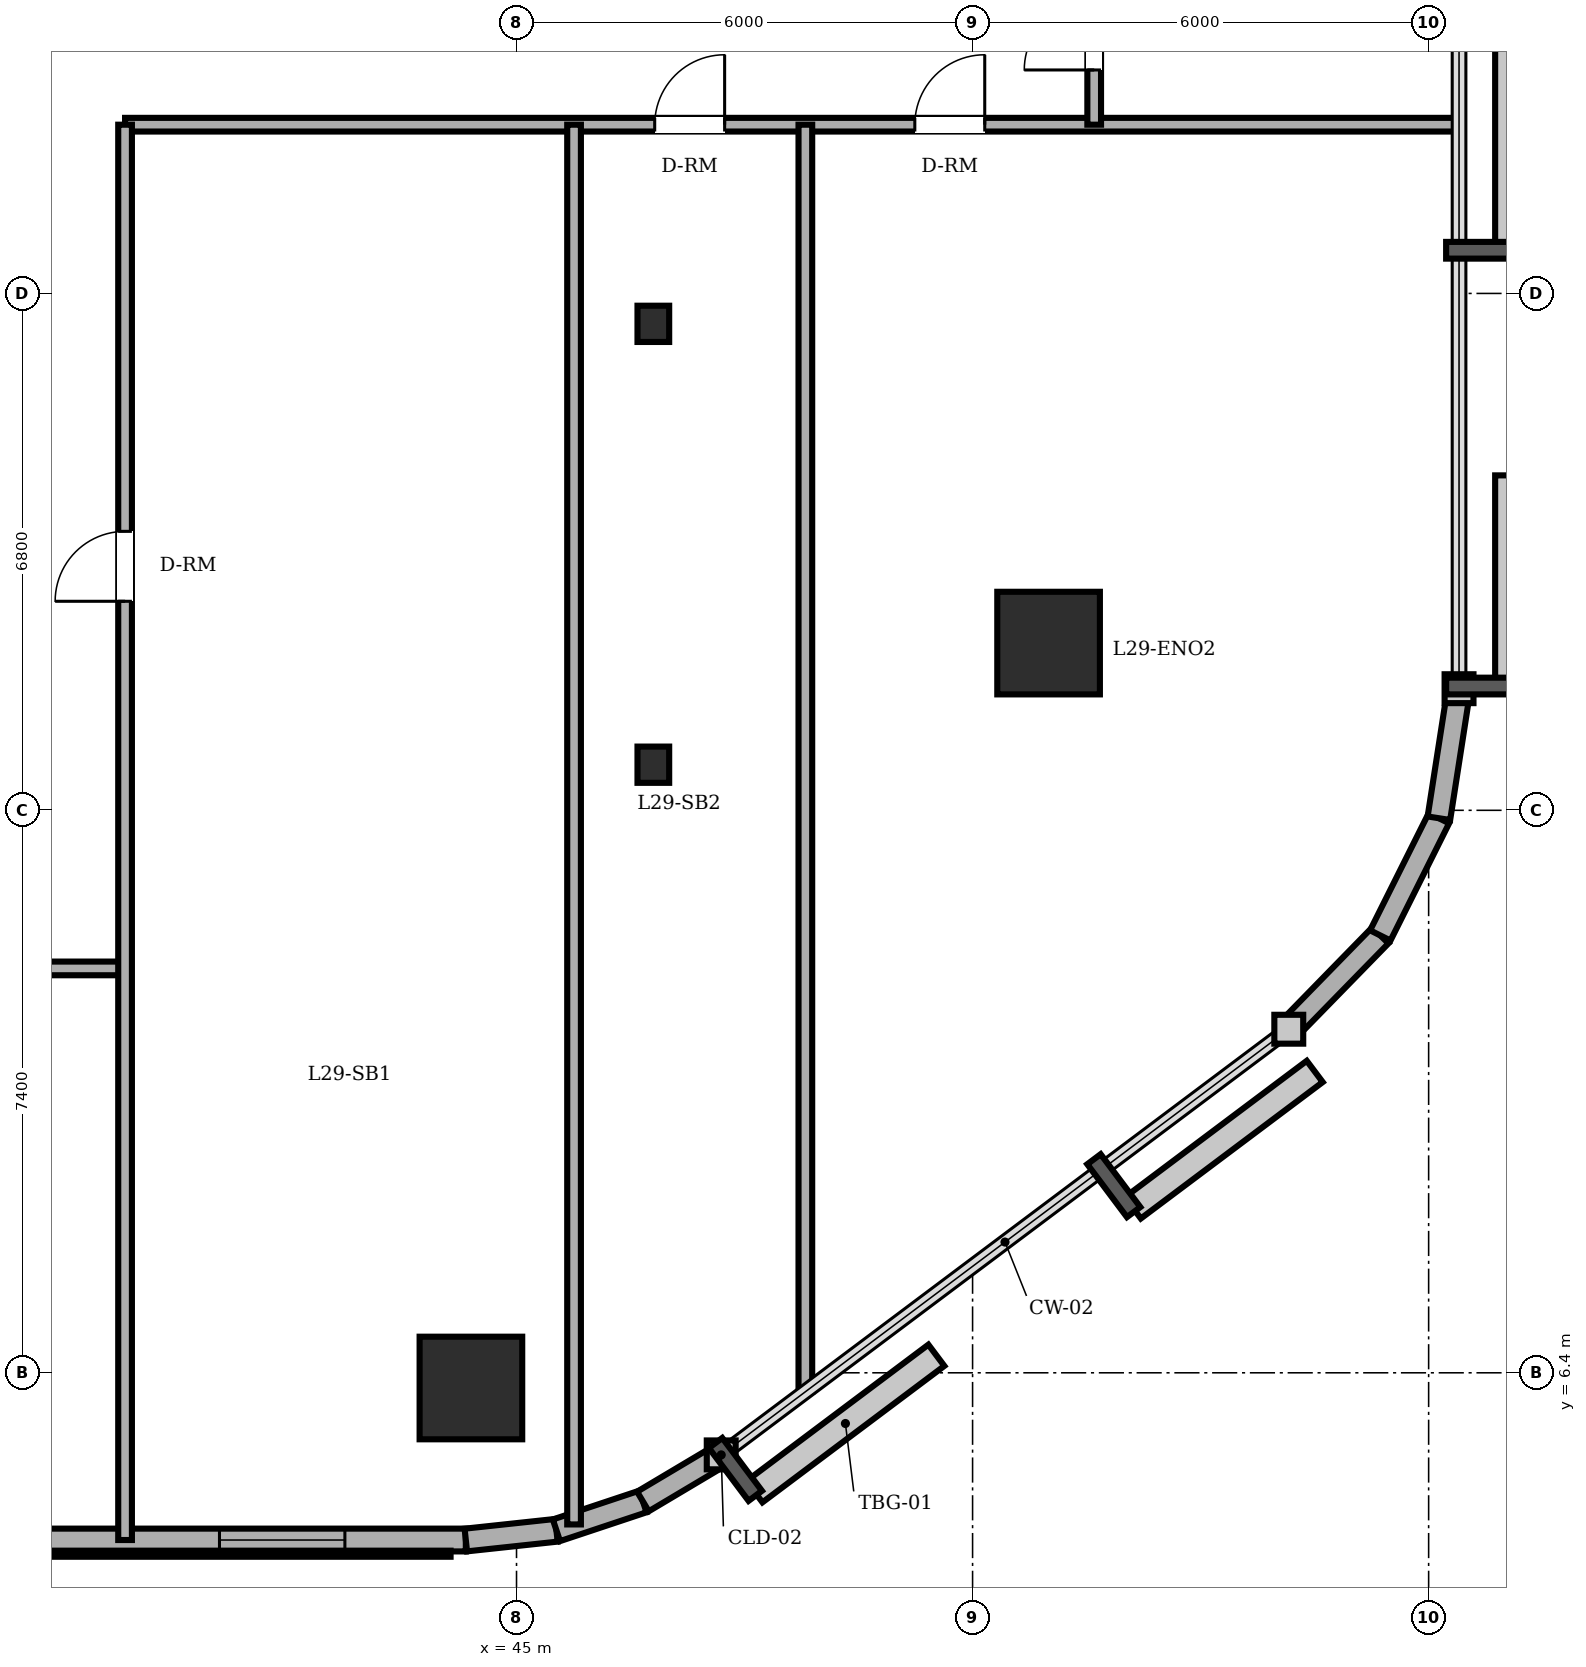
"""IFC4 building model, lengths in metres.
Left out: names, types, materials, properties, quantities, classifications, styles, units other than length and angle.
Written with IfcOpenShell. Run it as: python <this file> out.ifc"""

import sys

from ifc_helpers import new_model, si_unit, direction, frame, frame_2d, origin, origin_2d, place, context, subcontext, project, spatial, rectangle, circle, i_section, extrude, element, fill, save


model = new_model("IFC4")
c1 = context("Model", 3, precision=1e-05, world=origin(), true_north=direction((0.0, 1.0)))
c2 = subcontext(c1, "Body", "Model", "MODEL_VIEW")
j1 = project(units=[si_unit("LENGTHUNIT", "METRE"), si_unit("PLANEANGLEUNIT", "RADIAN")], contexts=[c1])
p1 = place(None, origin())
s1 = spatial("IfcSite", under=j1, at=p1, CompositionType="ELEMENT")
p2 = place(p1, origin())
s2 = spatial("IfcBuilding", under=s1, at=p2, CompositionType="ELEMENT")
p3 = place(p2, frame((0.0, 0.0, 111.5)))
s3 = spatial("IfcBuildingStorey", under=s2, at=p3, CompositionType="ELEMENT", Elevation=111.5)
for number, where, z_axis, x_axis in (
    (1, (44.4, 6.2, 0.0), (0.0, 0.0, 1.0), (1.0, 0.0, 0.0)),
    (2, (52.0, 16.0, 0.0), (0.0, 0.0, 1.0), (1.0, 0.0, 0.0)),
):
    element("IfcColumn", number, at=place(p3, frame(where, z_axis=z_axis, x_axis=x_axis)), inside=s3, PredefinedType="COLUMN", context=c2, shape_type="SweptSolid", body=[
        extrude(circle(Radius=0.675, at=origin_2d()), origin(), (0.0, 0.0, 1.0), 3.6),
    ])
for number, where, z_axis, x_axis in (
    (3, (46.8, 14.4, 0.0), (0.0, 0.0, 1.0), (1.0, 0.0, 0.0)),
    (4, (46.8, 20.2, 0.0), (0.0, 0.0, 1.0), (1.0, 0.0, 0.0)),
):
    element("IfcColumn", number, at=place(p3, frame(where, z_axis=z_axis, x_axis=x_axis)), inside=s3, PredefinedType="COLUMN", context=c2, shape_type="SweptSolid", body=[
        extrude(i_section(OverallWidth=0.417, OverallDepth=0.477, WebThickness=0.036, FlangeThickness=0.057, FilletRadius=0.015, at=origin_2d()), origin(), (0.0, 0.0, 1.0), 3.6),
    ])
p4 = place(p3, frame((14.4, 4.2, 0.0), z_axis=(0.0, 0.0, 1.0), x_axis=(1.0, 0.0, 0.0)))
e5 = element("IfcWall", 5, at=p4, inside=s3, PredefinedType="SOLIDWALL", context=c2, shape_type="SweptSolid", body=[
    extrude(rectangle(XDim=29.933, YDim=0.3, at=frame_2d((14.967, 0.0))), origin(), (0.0, 0.0, 1.0), 3.4),
])
p5 = place(p4, frame((10.625, 0.0, 0.0)))
e6 = element("IfcOpeningElement", 6, at=p5, cuts=e5, PredefinedType="OPENING", context=c2, shape_type="SweptSolid", body=[
    extrude(rectangle(XDim=0.95, YDim=2.2, at=frame_2d((0.475, 1.1))), frame((0.0, 0.16, 0.0), z_axis=(0.0, -1.0, 0.0), x_axis=(1.0, 0.0, 0.0)), (0.0, 0.0, 1.0), 0.32),
])
p6 = place(p4, frame((2.808, 0.0, 0.85)))
e7 = element("IfcOpeningElement", 7, at=p6, cuts=e5, PredefinedType="OPENING", context=c2, shape_type="SweptSolid", body=[
    extrude(rectangle(XDim=1.65, YDim=1.55, at=frame_2d((0.825, 0.775))), frame((0.0, 0.16, 0.0), z_axis=(0.0, -1.0, 0.0), x_axis=(1.0, 0.0, 0.0)), (0.0, 0.0, 1.0), 0.32),
])
p7 = place(p4, frame((6.092, 0.0, 0.85)))
e8 = element("IfcOpeningElement", 8, at=p7, cuts=e5, PredefinedType="OPENING", context=c2, shape_type="SweptSolid", body=[
    extrude(rectangle(XDim=1.65, YDim=1.55, at=frame_2d((0.825, 0.775))), frame((0.0, 0.16, 0.0), z_axis=(0.0, -1.0, 0.0), x_axis=(1.0, 0.0, 0.0)), (0.0, 0.0, 1.0), 0.32),
])
p8 = place(p4, frame((16.992, 0.0, 0.85)))
e9 = element("IfcOpeningElement", 9, at=p8, cuts=e5, PredefinedType="OPENING", context=c2, shape_type="SweptSolid", body=[
    extrude(rectangle(XDim=1.65, YDim=1.55, at=frame_2d((0.825, 0.775))), frame((0.0, 0.16, 0.0), z_axis=(0.0, -1.0, 0.0), x_axis=(1.0, 0.0, 0.0)), (0.0, 0.0, 1.0), 0.32),
])
p9 = place(p4, frame((20.808, 0.0, 0.85)))
e10 = element("IfcOpeningElement", 10, at=p9, cuts=e5, PredefinedType="OPENING", context=c2, shape_type="SweptSolid", body=[
    extrude(rectangle(XDim=1.65, YDim=1.55, at=frame_2d((0.825, 0.775))), frame((0.0, 0.16, 0.0), z_axis=(0.0, -1.0, 0.0), x_axis=(1.0, 0.0, 0.0)), (0.0, 0.0, 1.0), 0.32),
])
p10 = place(p4, frame((26.692, 0.0, 0.85)))
e11 = element("IfcOpeningElement", 11, at=p10, cuts=e5, PredefinedType="OPENING", context=c2, shape_type="SweptSolid", body=[
    extrude(rectangle(XDim=1.65, YDim=1.55, at=frame_2d((0.825, 0.775))), frame((0.0, 0.16, 0.0), z_axis=(0.0, -1.0, 0.0), x_axis=(1.0, 0.0, 0.0)), (0.0, 0.0, 1.0), 0.32),
])
p11 = place(p3, frame((44.333, 4.2, 0.0), z_axis=(0.0, 0.0, 1.0), x_axis=(0.994289103787, 0.106720092254, 0.0)))
e12 = element("IfcWall", 12, at=p11, inside=s3, PredefinedType="SOLIDWALL", context=c2, shape_type="SweptSolid", body=[
    extrude(rectangle(XDim=1.199, YDim=0.3, at=frame_2d((0.599, 0.0))), origin(), (0.0, 0.0, 1.0), 3.4),
])
p12 = place(p3, frame((45.525, 4.328, 0.0), z_axis=(0.0, 0.0, 1.0), x_axis=(0.948744332129, 0.316044604847, 0.0)))
e13 = element("IfcWall", 13, at=p12, inside=s3, PredefinedType="SOLIDWALL", context=c2, shape_type="SweptSolid", body=[
    extrude(rectangle(XDim=1.2, YDim=0.3, at=frame_2d((0.6, 0.0))), origin(), (0.0, 0.0, 1.0), 3.4),
])
p13 = place(p3, frame((46.663, 4.707, 0.0), z_axis=(0.0, 0.0, 1.0), x_axis=(0.859320591642, 0.511437308749, 0.0)))
e14 = element("IfcWall", 14, at=p13, inside=s3, PredefinedType="SOLIDWALL", context=c2, shape_type="SweptSolid", body=[
    extrude(rectangle(XDim=1.199, YDim=0.3, at=frame_2d((0.599, 0.0))), origin(), (0.0, 0.0, 1.0), 3.4),
])
for number, where, z_axis, x_axis in (
    (15, (55.16, 10.92, 0.0), (0.0, 0.0, 1.0), (0.698, 0.716, 0.0)),
    (16, (56.364, 12.154, 0.0), (0.0, 0.0, 1.0), (0.447, 0.894, 0.0)),
):
    element("IfcWall", number, at=place(p3, frame(where, z_axis=z_axis, x_axis=x_axis)), inside=s3, PredefinedType="SOLIDWALL", context=c2, shape_type="SweptSolid", body=[
        extrude(rectangle(XDim=1.724, YDim=0.3, at=frame_2d((0.862, 0.0))), origin(), (0.0, 0.0, 1.0), 3.4),
    ])
p14 = place(p3, frame((57.135, 13.696, 0.0), z_axis=(0.0, 0.0, 1.0), x_axis=(0.153620989032, 0.988129845581, 0.0)))
e17 = element("IfcWall", 17, at=p14, inside=s3, PredefinedType="SOLIDWALL", context=c2, shape_type="SweptSolid", body=[
    extrude(rectangle(XDim=1.724, YDim=0.3, at=frame_2d((0.862, 0.0))), origin(), (0.0, 0.0, 1.0), 3.4),
])
p15 = place(p3, frame((8.8, 11.72, 0.0), z_axis=(0.0, 0.0, 1.0), x_axis=(1.0, 0.0, 0.0)))
e18 = element("IfcWall", 18, at=p15, inside=s3, PredefinedType="PARTITIONING", context=c2, shape_type="SweptSolid", body=[
    extrude(rectangle(XDim=31.05, YDim=0.18, at=frame_2d((15.525, 0.0))), origin(), (0.0, 0.0, 1.0), 3.4),
])
p16 = place(p15, frame((17.24, 0.0, 0.0)))
e19 = element("IfcOpeningElement", 19, at=p16, cuts=e18, PredefinedType="OPENING", context=c2, shape_type="SweptSolid", body=[
    extrude(rectangle(XDim=0.92, YDim=2.1, at=frame_2d((0.46, 1.05))), frame((0.0, 0.1, 0.0), z_axis=(0.0, -1.0, 0.0), x_axis=(1.0, 0.0, 0.0)), (0.0, 0.0, 1.0), 0.2),
])
p17 = place(p15, frame((8.04, 0.0, 0.0)))
e20 = element("IfcOpeningElement", 20, at=p17, cuts=e18, PredefinedType="OPENING", context=c2, shape_type="SweptSolid", body=[
    extrude(rectangle(XDim=0.92, YDim=2.1, at=frame_2d((0.46, 1.05))), frame((0.0, 0.1, 0.0), z_axis=(0.0, -1.0, 0.0), x_axis=(1.0, 0.0, 0.0)), (0.0, 0.0, 1.0), 0.2),
])
p18 = place(p15, frame((24.605, 0.0, 0.0)))
e21 = element("IfcOpeningElement", 21, at=p18, cuts=e18, PredefinedType="OPENING", context=c2, shape_type="SweptSolid", body=[
    extrude(rectangle(XDim=0.92, YDim=2.1, at=frame_2d((0.46, 1.05))), frame((0.0, 0.1, 0.0), z_axis=(0.0, -1.0, 0.0), x_axis=(1.0, 0.0, 0.0)), (0.0, 0.0, 1.0), 0.2),
])
p19 = place(p3, frame((39.85, 22.82, 0.0), z_axis=(0.0, 0.0, 1.0), x_axis=(1.0, 0.0, 0.0)))
e22 = element("IfcWall", 22, at=p19, inside=s3, PredefinedType="PARTITIONING", context=c2, shape_type="SweptSolid", body=[
    extrude(rectangle(XDim=17.55, YDim=0.18, at=frame_2d((8.775, 0.0))), origin(), (0.0, 0.0, 1.0), 3.4),
])
p20 = place(p19, frame((6.968, 0.0, 0.0)))
e23 = element("IfcOpeningElement", 23, at=p20, cuts=e22, PredefinedType="OPENING", context=c2, shape_type="SweptSolid", body=[
    extrude(rectangle(XDim=0.92, YDim=2.1, at=frame_2d((0.46, 1.05))), frame((0.0, 0.1, 0.0), z_axis=(0.0, -1.0, 0.0), x_axis=(1.0, 0.0, 0.0)), (0.0, 0.0, 1.0), 0.2),
])
p21 = place(p19, frame((10.39, 0.0, 0.0)))
e24 = element("IfcOpeningElement", 24, at=p21, cuts=e22, PredefinedType="OPENING", context=c2, shape_type="SweptSolid", body=[
    extrude(rectangle(XDim=0.92, YDim=2.1, at=frame_2d((0.46, 1.05))), frame((0.0, 0.1, 0.0), z_axis=(0.0, -1.0, 0.0), x_axis=(1.0, 0.0, 0.0)), (0.0, 0.0, 1.0), 0.2),
])
p22 = place(p3, frame((39.85, 4.2, 0.0), z_axis=(0.0, 0.0, 1.0), x_axis=(0.0, 1.0, 0.0)))
e25 = element("IfcWall", 25, at=p22, inside=s3, PredefinedType="PARTITIONING", context=c2, shape_type="SweptSolid", body=[
    extrude(rectangle(XDim=18.62, YDim=0.18, at=frame_2d((9.31, 0.0))), origin(), (0.0, 0.0, 1.0), 3.4),
])
p23 = place(p22, frame((12.35, 0.0, 0.0)))
e26 = element("IfcOpeningElement", 26, at=p23, cuts=e25, PredefinedType="OPENING", context=c2, shape_type="SweptSolid", body=[
    extrude(rectangle(XDim=0.92, YDim=2.1, at=frame_2d((0.46, 1.05))), frame((0.0, 0.1, 0.0), z_axis=(0.0, -1.0, 0.0), x_axis=(1.0, 0.0, 0.0)), (0.0, 0.0, 1.0), 0.2),
])
p24 = place(p3, frame((45.757, 4.405, 0.0), z_axis=(0.0, 0.0, 1.0), x_axis=(0.0, 1.0, 0.0)))
e27 = element("IfcWall", 27, at=p24, inside=s3, PredefinedType="PARTITIONING", context=c2, shape_type="SweptSolid", body=[
    extrude(rectangle(XDim=18.415, YDim=0.18, at=frame_2d((9.208, 0.0))), origin(), (0.0, 0.0, 1.0), 2.882),
])
p25 = place(p3, frame((48.8, 6.15, 0.0), z_axis=(0.0, 0.0, 1.0), x_axis=(0.0, 1.0, 0.0)))
e28 = element("IfcWall", 28, at=p25, inside=s3, PredefinedType="PARTITIONING", context=c2, shape_type="SweptSolid", body=[
    extrude(rectangle(XDim=16.67, YDim=0.18, at=frame_2d((8.335, 0.0))), origin(), (0.0, 0.0, 1.0), 3.4),
])
p26 = place(p3, frame((52.6, 22.82, 0.0), z_axis=(0.0, 0.0, 1.0), x_axis=(0.0, 1.0, 0.0)))
e29 = element("IfcWall", 29, at=p26, inside=s3, PredefinedType="PARTITIONING", context=c2, shape_type="SweptSolid", body=[
    extrude(rectangle(XDim=2.36, YDim=0.18, at=frame_2d((1.18, 0.0))), origin(), (0.0, 0.0, 1.0), 3.4),
])
p27 = place(p26, frame((0.72, 0.0, 0.0)))
e30 = element("IfcOpeningElement", 30, at=p27, cuts=e29, PredefinedType="OPENING", context=c2, shape_type="SweptSolid", body=[
    extrude(rectangle(XDim=0.92, YDim=2.1, at=frame_2d((0.46, 1.05))), frame((0.0, 0.1, 0.0), z_axis=(0.0, -1.0, 0.0), x_axis=(1.0, 0.0, 0.0)), (0.0, 0.0, 1.0), 0.2),
])
p28 = place(p10, origin())
e31 = element("IfcWindow", 31, at=p28, inside=s3, PartitioningType="DOUBLE_PANEL_VERTICAL", PredefinedType="WINDOW", context=c2, shape_type="SweptSolid", body=[
    extrude(rectangle(XDim=1.65, YDim=1.55, at=frame_2d((0.825, 0.775))), frame((0.0, 0.03, 0.0), z_axis=(0.0, -1.0, 0.0), x_axis=(1.0, 0.0, 0.0)), (0.0, 0.0, 1.0), 0.06),
])
fill(e11, e31)
p29 = place(p23, origin())
e32 = element("IfcDoor", 32, at=p29, inside=s3, OperationType="SINGLE_SWING_LEFT", PredefinedType="DOOR", context=c2, shape_type="SweptSolid", body=[
    extrude(rectangle(XDim=0.92, YDim=2.1, at=frame_2d((0.46, 1.05))), frame((0.0, 0.025, 0.0), z_axis=(0.0, -1.0, 0.0), x_axis=(1.0, 0.0, 0.0)), (0.0, 0.0, 1.0), 0.05),
])
fill(e26, e32)
p30 = place(p20, origin())
e33 = element("IfcDoor", 33, at=p30, inside=s3, OperationType="SINGLE_SWING_RIGHT", PredefinedType="DOOR", context=c2, shape_type="SweptSolid", body=[
    extrude(rectangle(XDim=0.92, YDim=2.1, at=frame_2d((0.46, 1.05))), frame((0.0, 0.025, 0.0), z_axis=(0.0, -1.0, 0.0), x_axis=(1.0, 0.0, 0.0)), (0.0, 0.0, 1.0), 0.05),
])
fill(e23, e33)
p31 = place(p21, origin())
e34 = element("IfcDoor", 34, at=p31, inside=s3, OperationType="SINGLE_SWING_RIGHT", PredefinedType="DOOR", context=c2, shape_type="SweptSolid", body=[
    extrude(rectangle(XDim=0.92, YDim=2.1, at=frame_2d((0.46, 1.05))), frame((0.0, 0.025, 0.0), z_axis=(0.0, -1.0, 0.0), x_axis=(1.0, 0.0, 0.0)), (0.0, 0.0, 1.0), 0.05),
])
fill(e24, e34)
p32 = place(p27, origin())
e35 = element("IfcDoor", 35, at=p32, inside=s3, OperationType="SINGLE_SWING_LEFT", PredefinedType="DOOR", context=c2, shape_type="SweptSolid", body=[
    extrude(rectangle(XDim=0.92, YDim=2.1, at=frame_2d((0.46, 1.05))), frame((0.0, 0.025, 0.0), z_axis=(0.0, -1.0, 0.0), x_axis=(1.0, 0.0, 0.0)), (0.0, 0.0, 1.0), 0.05),
])
fill(e30, e35)
save(model, sys.argv[1])
